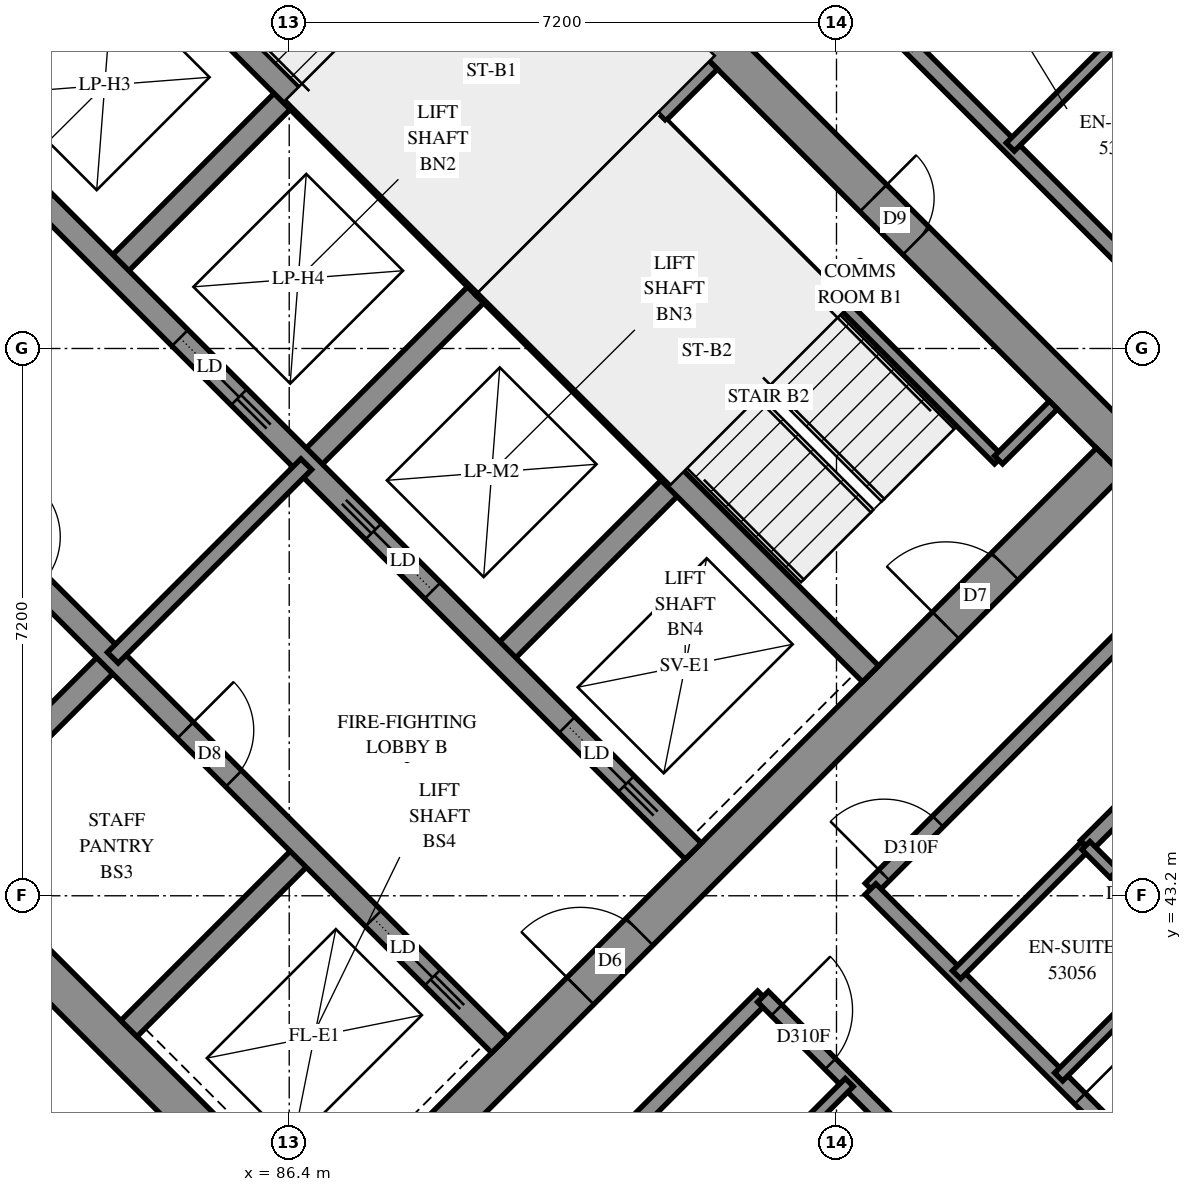
"""IFC4 building model, lengths in metres.
Left out: names, types, materials, properties, quantities, classifications, styles, units other than length and angle.
Written with IfcOpenShell. Run it as: python <this file> out.ifc"""

import sys

from ifc_helpers import new_model, si_unit, direction, frame, frame_2d, origin, place, context, subcontext, project, spatial, rectangle, extrude, element, fill, save


model = new_model("IFC4")
c1 = context("Model", 3, precision=1e-05, world=origin(), true_north=direction((0.0, 1.0)))
c2 = subcontext(c1, "Body", "Model", "MODEL_VIEW")
j1 = project(units=[si_unit("LENGTHUNIT", "METRE"), si_unit("PLANEANGLEUNIT", "RADIAN")], contexts=[c1])
p1 = place(None, origin())
s1 = spatial("IfcSite", under=j1, at=p1, CompositionType="ELEMENT")
p2 = place(p1, origin())
s2 = spatial("IfcBuilding", under=s1, at=p2, CompositionType="ELEMENT")
p3 = place(p2, frame((0.0, 0.0, 196.4)))
s3 = spatial("IfcBuildingStorey", under=s2, at=p3, CompositionType="ELEMENT", Elevation=196.4)
p4 = place(p3, frame((76.124, 49.267, -0.3), z_axis=(0.0, 0.0, 1.0), x_axis=(0.7071067812, -0.7071067812, 0.0)))
e1 = element("IfcWall", 1, at=p4, inside=s3, PredefinedType="SHEAR", context=c2, shape_type="SweptSolid", body=[
    extrude(rectangle(XDim=15.4, YDim=0.5, at=frame_2d((7.7, 0.0))), origin(), (0.0, 0.0, 1.0), 2.7),
])
p5 = place(p3, frame((86.66, 59.802, -0.3), z_axis=(0.0, 0.0, 1.0), x_axis=(0.7071067812, -0.7071067812, 0.0)))
e2 = element("IfcWall", 2, at=p5, inside=s3, PredefinedType="SHEAR", context=c2, shape_type="SweptSolid", body=[
    extrude(rectangle(XDim=15.4, YDim=0.5, at=frame_2d((7.7, 0.0))), origin(), (0.0, 0.0, 1.0), 2.7),
])
p6 = place(p5, frame((10.5, 0.0, 0.3)))
e3 = element("IfcOpeningElement", 3, at=p6, cuts=e2, PredefinedType="OPENING", context=c2, shape_type="SweptSolid", body=[
    extrude(rectangle(XDim=0.8, YDim=2.1, at=frame_2d((0.4, 1.05))), frame((0.0, 0.26, 0.0), z_axis=(0.0, -1.0, 0.0), x_axis=(1.0, 0.0, 0.0)), (0.0, 0.0, 1.0), 0.52),
])
p7 = place(p3, frame((76.478, 49.267, -0.3), z_axis=(0.0, 0.0, 1.0), x_axis=(0.7071067812, 0.7071067812, 0.0)))
e4 = element("IfcWall", 4, at=p7, inside=s3, PredefinedType="SHEAR", context=c2, shape_type="SweptSolid", body=[
    extrude(rectangle(XDim=14.4, YDim=0.5, at=frame_2d((7.2, 0.0))), origin(), (0.0, 0.0, 1.0), 2.7),
])
p8 = place(p7, frame((4.55, 0.0, 0.3)))
e5 = element("IfcOpeningElement", 5, at=p8, cuts=e4, PredefinedType="OPENING", context=c2, shape_type="SweptSolid", body=[
    extrude(rectangle(XDim=1.1, YDim=2.1, at=frame_2d((0.55, 1.05))), frame((0.0, 0.26, 0.0), z_axis=(0.0, -1.0, 0.0), x_axis=(1.0, 0.0, 0.0)), (0.0, 0.0, 1.0), 0.52),
])
p9 = place(p7, frame((11.35, 0.0, 0.3)))
e6 = element("IfcOpeningElement", 6, at=p9, cuts=e4, PredefinedType="OPENING", context=c2, shape_type="SweptSolid", body=[
    extrude(rectangle(XDim=1.1, YDim=2.1, at=frame_2d((0.55, 1.05))), frame((0.0, 0.26, 0.0), z_axis=(0.0, -1.0, 0.0), x_axis=(1.0, 0.0, 0.0)), (0.0, 0.0, 1.0), 0.52),
])
p10 = place(p3, frame((87.013, 38.731, -0.3), z_axis=(0.0, 0.0, 1.0), x_axis=(0.7071067812, 0.7071067812, 0.0)))
e7 = element("IfcWall", 7, at=p10, inside=s3, PredefinedType="SHEAR", context=c2, shape_type="SweptSolid", body=[
    extrude(rectangle(XDim=14.4, YDim=0.5, at=frame_2d((7.2, 0.0))), origin(), (0.0, 0.0, 1.0), 2.7),
])
p11 = place(p10, frame((4.55, 0.0, 0.3)))
e8 = element("IfcOpeningElement", 8, at=p11, cuts=e7, PredefinedType="OPENING", context=c2, shape_type="SweptSolid", body=[
    extrude(rectangle(XDim=1.1, YDim=2.1, at=frame_2d((0.55, 1.05))), frame((0.0, 0.26, 0.0), z_axis=(0.0, -1.0, 0.0), x_axis=(1.0, 0.0, 0.0)), (0.0, 0.0, 1.0), 0.52),
])
p12 = place(p10, frame((11.35, 0.0, 0.3)))
e9 = element("IfcOpeningElement", 9, at=p12, cuts=e7, PredefinedType="OPENING", context=c2, shape_type="SweptSolid", body=[
    extrude(rectangle(XDim=1.1, YDim=2.1, at=frame_2d((0.55, 1.05))), frame((0.0, 0.26, 0.0), z_axis=(0.0, -1.0, 0.0), x_axis=(1.0, 0.0, 0.0)), (0.0, 0.0, 1.0), 0.52),
])
p13 = place(p3, frame((84.079, 51.423, 0.0), z_axis=(0.0, 0.0, 1.0), x_axis=(0.7071219326, 0.7070916295, 0.0)))
e10 = element("IfcWall", 10, at=p13, inside=s3, PredefinedType="SOLIDWALL", context=c2, shape_type="SweptSolid", body=[
    extrude(rectangle(XDim=3.3, YDim=0.3, at=frame_2d((1.65, 0.0))), origin(), (0.0, 0.0, 1.0), 3.1),
])
p14 = place(p3, frame((81.746, 43.999, 0.0), z_axis=(0.0, 0.0, 1.0), x_axis=(0.7071067812, 0.7071067812, 0.0)))
e11 = element("IfcWall", 11, at=p14, inside=s3, PredefinedType="SOLIDWALL", context=c2, shape_type="SweptSolid", body=[
    extrude(rectangle(XDim=3.3, YDim=0.3, at=frame_2d((1.65, 0.0))), origin(), (0.0, 0.0, 1.0), 3.1),
])
p15 = place(p3, frame((86.625, 48.878, 0.0), z_axis=(0.0, 0.0, 1.0), x_axis=(0.7071067812, 0.7071067812, 0.0)))
e12 = element("IfcWall", 12, at=p15, inside=s3, PredefinedType="SOLIDWALL", context=c2, shape_type="SweptSolid", body=[
    extrude(rectangle(XDim=3.3, YDim=0.3, at=frame_2d((1.65, 0.0))), origin(), (0.0, 0.0, 1.0), 3.1),
])
p16 = place(p3, frame((84.291, 41.453, 0.0), z_axis=(0.0, 0.0, 1.0), x_axis=(0.7071067812, 0.7071067812, 0.0)))
e13 = element("IfcWall", 13, at=p16, inside=s3, PredefinedType="SOLIDWALL", context=c2, shape_type="SweptSolid", body=[
    extrude(rectangle(XDim=3.3, YDim=0.3, at=frame_2d((1.65, 0.0))), origin(), (0.0, 0.0, 1.0), 3.1),
])
p17 = place(p3, frame((89.17, 46.332, 0.0), z_axis=(0.0, 0.0, 1.0), x_axis=(0.7071067812, 0.7071067812, 0.0)))
e14 = element("IfcWall", 14, at=p17, inside=s3, PredefinedType="SOLIDWALL", context=c2, shape_type="SweptSolid", body=[
    extrude(rectangle(XDim=3.3, YDim=0.3, at=frame_2d((1.65, 0.0))), origin(), (0.0, 0.0, 1.0), 3.1),
])
p18 = place(p3, frame((78.988, 51.423, 0.0), z_axis=(0.0, 0.0, 1.0), x_axis=(0.7071067812, -0.7071067812, 0.0)))
e15 = element("IfcWall", 15, at=p18, inside=s3, PredefinedType="SOLIDWALL", context=c2, shape_type="SweptSolid", body=[
    extrude(rectangle(XDim=14.4, YDim=0.3, at=frame_2d((7.2, 0.0))), origin(), (0.0, 0.0, 1.0), 3.1),
])
p19 = place(p18, frame((1.35, 0.0, 0.0)))
e16 = element("IfcOpeningElement", 16, at=p19, cuts=e15, PredefinedType="OPENING", context=c2, shape_type="SweptSolid", body=[
    extrude(rectangle(XDim=0.9, YDim=2.1, at=frame_2d((0.45, 1.05))), frame((0.0, 0.16, 0.0), z_axis=(0.0, -1.0, 0.0), x_axis=(1.0, 0.0, 0.0)), (0.0, 0.0, 1.0), 0.32),
])
p20 = place(p18, frame((4.95, 0.0, 0.0)))
e17 = element("IfcOpeningElement", 17, at=p20, cuts=e15, PredefinedType="OPENING", context=c2, shape_type="SweptSolid", body=[
    extrude(rectangle(XDim=0.9, YDim=2.1, at=frame_2d((0.45, 1.05))), frame((0.0, 0.16, 0.0), z_axis=(0.0, -1.0, 0.0), x_axis=(1.0, 0.0, 0.0)), (0.0, 0.0, 1.0), 0.32),
])
p21 = place(p18, frame((8.55, 0.0, 0.0)))
e18 = element("IfcOpeningElement", 18, at=p21, cuts=e15, PredefinedType="OPENING", context=c2, shape_type="SweptSolid", body=[
    extrude(rectangle(XDim=0.9, YDim=2.1, at=frame_2d((0.45, 1.05))), frame((0.0, 0.16, 0.0), z_axis=(0.0, -1.0, 0.0), x_axis=(1.0, 0.0, 0.0)), (0.0, 0.0, 1.0), 0.32),
])
p22 = place(p18, frame((12.05, 0.0, 0.0)))
e19 = element("IfcOpeningElement", 19, at=p22, cuts=e15, PredefinedType="OPENING", context=c2, shape_type="SweptSolid", body=[
    extrude(rectangle(XDim=1.1, YDim=2.1, at=frame_2d((0.55, 1.05))), frame((0.0, 0.16, 0.0), z_axis=(0.0, -1.0, 0.0), x_axis=(1.0, 0.0, 0.0)), (0.0, 0.0, 1.0), 0.32),
])
p23 = place(p3, frame((81.534, 53.969, 0.0), z_axis=(0.0, 0.0, 1.0), x_axis=(0.707103309, -0.7071102534, 0.0)))
e20 = element("IfcWall", 20, at=p23, inside=s3, PredefinedType="SOLIDWALL", context=c2, shape_type="SweptSolid", body=[
    extrude(rectangle(XDim=14.4, YDim=0.3, at=frame_2d((7.2, 0.0))), origin(), (0.0, 0.0, 1.0), 3.1),
])
p24 = place(p23, frame((1.25, 0.0, 0.0)))
e21 = element("IfcOpeningElement", 21, at=p24, cuts=e20, PredefinedType="OPENING", context=c2, shape_type="SweptSolid", body=[
    extrude(rectangle(XDim=1.1, YDim=2.1, at=frame_2d((0.55, 1.05))), frame((0.0, 0.16, 0.0), z_axis=(0.0, -1.0, 0.0), x_axis=(1.0, 0.0, 0.0)), (0.0, 0.0, 1.0), 0.32),
])
p25 = place(p23, frame((4.85, 0.0, 0.0)))
e22 = element("IfcOpeningElement", 22, at=p25, cuts=e20, PredefinedType="OPENING", context=c2, shape_type="SweptSolid", body=[
    extrude(rectangle(XDim=1.1, YDim=2.1, at=frame_2d((0.55, 1.05))), frame((0.0, 0.16, 0.0), z_axis=(0.0, -1.0, 0.0), x_axis=(1.0, 0.0, 0.0)), (0.0, 0.0, 1.0), 0.32),
])
p26 = place(p23, frame((8.45, 0.0, 0.0)))
e23 = element("IfcOpeningElement", 23, at=p26, cuts=e20, PredefinedType="OPENING", context=c2, shape_type="SweptSolid", body=[
    extrude(rectangle(XDim=1.1, YDim=2.1, at=frame_2d((0.55, 1.05))), frame((0.0, 0.16, 0.0), z_axis=(0.0, -1.0, 0.0), x_axis=(1.0, 0.0, 0.0)), (0.0, 0.0, 1.0), 0.32),
])
p27 = place(p23, frame((12.05, 0.0, 0.0)))
e24 = element("IfcOpeningElement", 24, at=p27, cuts=e20, PredefinedType="OPENING", context=c2, shape_type="SweptSolid", body=[
    extrude(rectangle(XDim=1.1, YDim=2.1, at=frame_2d((0.55, 1.05))), frame((0.0, 0.16, 0.0), z_axis=(0.0, -1.0, 0.0), x_axis=(1.0, 0.0, 0.0)), (0.0, 0.0, 1.0), 0.32),
])
for number, where, z_axis, x_axis in (
    (25, (83.867, 56.302, 0.0), (0.0, 0.0, 1.0), (0.707, -0.707, 0.0)),
    (26, (88.958, 51.211, 0.0), (0.0, 0.0, 1.0), (0.707, -0.707, 0.0)),
):
    element("IfcWall", number, at=place(p3, frame(where, z_axis=z_axis, x_axis=x_axis)), inside=s3, PredefinedType="SOLIDWALL", context=c2, shape_type="SweptSolid", body=[
        extrude(rectangle(XDim=7.2, YDim=0.3, at=frame_2d((3.6, 0.0))), origin(), (0.0, 0.0, 1.0), 3.1),
    ])
p28 = place(p3, frame((88.958, 51.211, 0.0), z_axis=(0.0, 0.0, 1.0), x_axis=(0.7071067812, 0.7071067812, 0.0)))
e27 = element("IfcWall", 27, at=p28, inside=s3, PredefinedType="SOLIDWALL", context=c2, shape_type="SweptSolid", body=[
    extrude(rectangle(XDim=4.2, YDim=0.3, at=frame_2d((2.1, 0.0))), origin(), (0.0, 0.0, 1.0), 3.1),
])
p29 = place(p3, frame((91.313, 53.354, 0.0), z_axis=(0.0, 0.0, 1.0), x_axis=(0.7071147811, -0.7070987812, 0.0)))
e28 = element("IfcWall", 28, at=p29, inside=s3, PredefinedType="PARTITIONING", context=c2, shape_type="SweptSolid", body=[
    extrude(rectangle(XDim=6.25, YDim=0.15, at=frame_2d((3.125, 0.0))), origin(), (0.0, 0.0, 1.0), 3.1),
])
p30 = place(p3, frame((95.732, 48.934, 0.0), z_axis=(0.0, 0.0, 1.0), x_axis=(0.7071067812, 0.7071067812, 0.0)))
e29 = element("IfcWall", 29, at=p30, inside=s3, PredefinedType="PARTITIONING", context=c2, shape_type="SweptSolid", body=[
    extrude(rectangle(XDim=1.02, YDim=0.15, at=frame_2d((0.51, 0.0))), origin(), (0.0, 0.0, 1.0), 3.1),
])
p31 = place(p3, frame((84.079, 46.332, 0.0), z_axis=(0.0, 0.0, 1.0), x_axis=(0.7071067812, 0.7071067812, 0.0)))
e30 = element("IfcWall", 30, at=p31, inside=s3, PredefinedType="PARTITIONING", context=c2, shape_type="SweptSolid", body=[
    extrude(rectangle(XDim=3.6, YDim=0.2, at=frame_2d((1.8, 0.0))), origin(), (0.0, 0.0, 1.0), 3.1),
])
p32 = place(p3, frame((93.346, 55.599, 0.0), z_axis=(0.0, 0.0, 1.0), x_axis=(0.7071067812, -0.7071067812, 0.0)))
e31 = element("IfcWall", 31, at=p32, inside=s3, PredefinedType="PARTITIONING", context=c2, shape_type="SweptSolid", body=[
    extrude(rectangle(XDim=9.201, YDim=0.2, at=frame_2d((4.601, 0.0))), origin(), (0.0, 0.0, 1.0), 3.1),
])
p33 = place(p3, frame((94.049, 43.293, 0.0), z_axis=(0.0, 0.0, 1.0), x_axis=(0.7071067812, 0.7071067812, 0.0)))
e32 = element("IfcWall", 32, at=p33, inside=s3, PredefinedType="PARTITIONING", context=c2, shape_type="SweptSolid", body=[
    extrude(rectangle(XDim=8.2, YDim=0.2, at=frame_2d((4.1, 0.0))), origin(), (0.0, 0.0, 1.0), 3.1),
])
p34 = place(p33, frame((0.252, 0.0, 0.0)))
e33 = element("IfcOpeningElement", 33, at=p34, cuts=e32, PredefinedType="OPENING", context=c2, shape_type="SweptSolid", body=[
    extrude(rectangle(XDim=1.0, YDim=2.1, at=frame_2d((0.5, 1.05))), frame((0.0, 0.11, 0.0), z_axis=(0.0, -1.0, 0.0), x_axis=(1.0, 0.0, 0.0)), (0.0, 0.0, 1.0), 0.22),
])
p35 = place(p3, frame((86.835, 36.079, 0.0), z_axis=(0.0, 0.0, 1.0), x_axis=(0.7071067812, 0.7071067812, 0.0)))
e34 = element("IfcWall", 34, at=p35, inside=s3, PredefinedType="PARTITIONING", context=c2, shape_type="SweptSolid", body=[
    extrude(rectangle(XDim=8.2, YDim=0.2, at=frame_2d((4.1, 0.0))), origin(), (0.0, 0.0, 1.0), 3.1),
])
p36 = place(p3, frame((80.849, 42.061, 0.0), z_axis=(0.0, 0.0, 1.0), x_axis=(0.7071067812, -0.7071067812, 0.0)))
e35 = element("IfcWall", 35, at=p36, inside=s3, PredefinedType="PARTITIONING", context=c2, shape_type="SweptSolid", body=[
    extrude(rectangle(XDim=6.964, YDim=0.2, at=frame_2d((3.482, 0.0))), origin(), (0.0, 0.0, 1.0), 3.1),
])
p37 = place(p36, frame((5.159, 0.0, 0.0)))
e36 = element("IfcOpeningElement", 36, at=p37, cuts=e35, PredefinedType="OPENING", context=c2, shape_type="SweptSolid", body=[
    extrude(rectangle(XDim=0.9, YDim=2.1, at=frame_2d((0.45, 1.05))), frame((0.0, 0.11, 0.0), z_axis=(0.0, -1.0, 0.0), x_axis=(1.0, 0.0, 0.0)), (0.0, 0.0, 1.0), 0.22),
])
p38 = place(p3, frame((94.047, 43.287, 0.0), z_axis=(0.0, 0.0, 1.0), x_axis=(0.7071067812, -0.7071067812, 0.0)))
e37 = element("IfcWall", 37, at=p38, inside=s3, PredefinedType="PARTITIONING", context=c2, shape_type="SweptSolid", body=[
    extrude(rectangle(XDim=5.199, YDim=0.2, at=frame_2d((2.599, 0.0))), origin(), (0.0, 0.0, 1.0), 3.1),
])
p39 = place(p38, frame((3.898, 0.0, 0.0)))
e38 = element("IfcOpeningElement", 38, at=p39, cuts=e37, PredefinedType="OPENING", context=c2, shape_type="SweptSolid", body=[
    extrude(rectangle(XDim=0.9, YDim=2.1, at=frame_2d((0.45, 1.05))), frame((0.0, 0.11, 0.0), z_axis=(0.0, -1.0, 0.0), x_axis=(1.0, 0.0, 0.0)), (0.0, 0.0, 1.0), 0.22),
])
p40 = place(p3, frame((92.633, 41.873, 0.0), z_axis=(0.0, 0.0, 1.0), x_axis=(0.7071067812, -0.7071067812, 0.0)))
e39 = element("IfcWall", 39, at=p40, inside=s3, PredefinedType="PARTITIONING", context=c2, shape_type="SweptSolid", body=[
    extrude(rectangle(XDim=5.199, YDim=0.2, at=frame_2d((2.599, 0.0))), origin(), (0.0, 0.0, 1.0), 3.1),
])
p41 = place(p40, frame((0.253, 0.0, 0.0)))
e40 = element("IfcOpeningElement", 40, at=p41, cuts=e39, PredefinedType="OPENING", context=c2, shape_type="SweptSolid", body=[
    extrude(rectangle(XDim=1.0, YDim=2.1, at=frame_2d((0.5, 1.05))), frame((0.0, 0.11, 0.0), z_axis=(0.0, -1.0, 0.0), x_axis=(1.0, 0.0, 0.0)), (0.0, 0.0, 1.0), 0.22),
])
p42 = place(p40, frame((3.948, 0.0, 0.0)))
e41 = element("IfcOpeningElement", 41, at=p42, cuts=e39, PredefinedType="OPENING", context=c2, shape_type="SweptSolid", body=[
    extrude(rectangle(XDim=0.9, YDim=2.1, at=frame_2d((0.45, 1.05))), frame((0.0, 0.11, 0.0), z_axis=(0.0, -1.0, 0.0), x_axis=(1.0, 0.0, 0.0)), (0.0, 0.0, 1.0), 0.22),
])
p43 = place(p3, frame((96.88, 43.856, 0.0), z_axis=(0.0, 0.0, 1.0), x_axis=(0.7074098182, 0.7068036142, 0.0)))
e42 = element("IfcWall", 42, at=p43, inside=s3, PredefinedType="PARTITIONING", context=c2, shape_type="SweptSolid", body=[
    extrude(rectangle(XDim=3.299, YDim=0.2, at=frame_2d((1.65, 0.0))), origin(), (0.0, 0.0, 1.0), 3.1),
])
p44 = place(p3, frame((95.887, 53.051, 0.0), z_axis=(0.0, 0.0, 1.0), x_axis=(0.7070875415, 0.7071260204, 0.0)))
e43 = element("IfcWall", 43, at=p44, inside=s3, PredefinedType="PARTITIONING", context=c2, shape_type="SweptSolid", body=[
    extrude(rectangle(XDim=2.599, YDim=0.15, at=frame_2d((1.299, 0.0))), origin(), (0.0, 0.0, 1.0), 3.1),
])
for number, where, z_axis, x_axis in (
    (44, (96.523, 40.817, 0.0), (0.0, 0.0, 1.0), (0.707, 0.707, 0.0)),
    (45, (95.179, 42.161, 0.0), (0.0, 0.0, 1.0), (0.707, 0.707, 0.0)),
):
    element("IfcWall", number, at=place(p3, frame(where, z_axis=z_axis, x_axis=x_axis)), inside=s3, PredefinedType="PARTITIONING", context=c2, shape_type="SweptSolid", body=[
        extrude(rectangle(XDim=2.401, YDim=0.15, at=frame_2d((1.201, 0.0))), origin(), (0.0, 0.0, 1.0), 3.1),
    ])
p45 = place(p3, frame((92.072, 39.046, 0.0), z_axis=(0.0, 0.0, 1.0), x_axis=(0.706689978, 0.7075233388, 0.0)))
e46 = element("IfcWall", 46, at=p45, inside=s3, PredefinedType="PARTITIONING", context=c2, shape_type="SweptSolid", body=[
    extrude(rectangle(XDim=2.4, YDim=0.15, at=frame_2d((1.2, 0.0))), origin(), (0.0, 0.0, 1.0), 3.1),
])
p46 = place(p3, frame((96.881, 43.861, 0.0), z_axis=(0.0, 0.0, 1.0), x_axis=(0.7071067812, -0.7071067812, 0.0)))
e47 = element("IfcWall", 47, at=p46, inside=s3, PredefinedType="PARTITIONING", context=c2, shape_type="SweptSolid", body=[
    extrude(rectangle(XDim=1.901, YDim=0.15, at=frame_2d((0.95, 0.0))), origin(), (0.0, 0.0, 1.0), 3.1),
])
p47 = place(p46, frame((0.505, 0.0, 0.0)))
e48 = element("IfcOpeningElement", 48, at=p47, cuts=e47, PredefinedType="OPENING", context=c2, shape_type="SweptSolid", body=[
    extrude(rectangle(XDim=0.8, YDim=2.1, at=frame_2d((0.4, 1.05))), frame((0.0, 0.085, 0.0), z_axis=(0.0, -1.0, 0.0), x_axis=(1.0, 0.0, 0.0)), (0.0, 0.0, 1.0), 0.17),
])
p48 = place(p6, origin())
e49 = element("IfcDoor", 49, at=p48, inside=s3, OperationType="SINGLE_SWING_RIGHT", PredefinedType="DOOR", context=c2, shape_type="SweptSolid", body=[
    extrude(rectangle(XDim=0.8, YDim=2.1, at=frame_2d((0.4, 1.05))), frame((0.0, 0.025, 0.0), z_axis=(0.0, -1.0, 0.0), x_axis=(1.0, 0.0, 0.0)), (0.0, 0.0, 1.0), 0.05),
])
fill(e3, e49)
p49 = place(p11, origin())
e50 = element("IfcDoor", 50, at=p49, inside=s3, OperationType="DOUBLE_DOOR_SINGLE_SWING", PredefinedType="DOOR", context=c2, shape_type="SweptSolid", body=[
    extrude(rectangle(XDim=1.1, YDim=2.1, at=frame_2d((0.55, 1.05))), frame((0.0, 0.025, 0.0), z_axis=(0.0, -1.0, 0.0), x_axis=(1.0, 0.0, 0.0)), (0.0, 0.0, 1.0), 0.05),
])
fill(e8, e50)
p50 = place(p12, origin())
e51 = element("IfcDoor", 51, at=p50, inside=s3, OperationType="SINGLE_SWING_RIGHT", PredefinedType="DOOR", context=c2, shape_type="SweptSolid", body=[
    extrude(rectangle(XDim=1.1, YDim=2.1, at=frame_2d((0.55, 1.05))), frame((0.0, 0.025, 0.0), z_axis=(0.0, -1.0, 0.0), x_axis=(1.0, 0.0, 0.0)), (0.0, 0.0, 1.0), 0.05),
])
fill(e9, e51)
p51 = place(p21, origin())
e52 = element("IfcDoor", 52, at=p51, inside=s3, OperationType="SINGLE_SWING_LEFT", PredefinedType="DOOR", context=c2, shape_type="SweptSolid", body=[
    extrude(rectangle(XDim=0.9, YDim=2.1, at=frame_2d((0.45, 1.05))), frame((0.0, 0.025, 0.0), z_axis=(0.0, -1.0, 0.0), x_axis=(1.0, 0.0, 0.0)), (0.0, 0.0, 1.0), 0.05),
])
fill(e18, e52)
p52 = place(p22, origin())
e53 = element("IfcDoor", 53, at=p52, inside=s3, OperationType="SLIDING_TO_RIGHT", PredefinedType="DOOR", context=c2, shape_type="SweptSolid", body=[
    extrude(rectangle(XDim=1.1, YDim=2.1, at=frame_2d((0.55, 1.05))), frame((0.0, 0.025, 0.0), z_axis=(0.0, -1.0, 0.0), x_axis=(1.0, 0.0, 0.0)), (0.0, 0.0, 1.0), 0.05),
])
fill(e19, e53)
p53 = place(p25, origin())
e54 = element("IfcDoor", 54, at=p53, inside=s3, OperationType="SLIDING_TO_RIGHT", PredefinedType="DOOR", context=c2, shape_type="SweptSolid", body=[
    extrude(rectangle(XDim=1.1, YDim=2.1, at=frame_2d((0.55, 1.05))), frame((0.0, 0.025, 0.0), z_axis=(0.0, -1.0, 0.0), x_axis=(1.0, 0.0, 0.0)), (0.0, 0.0, 1.0), 0.05),
])
fill(e22, e54)
p54 = place(p26, origin())
e55 = element("IfcDoor", 55, at=p54, inside=s3, OperationType="SLIDING_TO_LEFT", PredefinedType="DOOR", context=c2, shape_type="SweptSolid", body=[
    extrude(rectangle(XDim=1.1, YDim=2.1, at=frame_2d((0.55, 1.05))), frame((0.0, 0.025, 0.0), z_axis=(0.0, -1.0, 0.0), x_axis=(1.0, 0.0, 0.0)), (0.0, 0.0, 1.0), 0.05),
])
fill(e23, e55)
p55 = place(p27, origin())
e56 = element("IfcDoor", 56, at=p55, inside=s3, OperationType="SLIDING_TO_RIGHT", PredefinedType="DOOR", context=c2, shape_type="SweptSolid", body=[
    extrude(rectangle(XDim=1.1, YDim=2.1, at=frame_2d((0.55, 1.05))), frame((0.0, 0.025, 0.0), z_axis=(0.0, -1.0, 0.0), x_axis=(1.0, 0.0, 0.0)), (0.0, 0.0, 1.0), 0.05),
])
fill(e24, e56)
p56 = place(p34, origin())
e57 = element("IfcDoor", 57, at=p56, inside=s3, OperationType="SINGLE_SWING_RIGHT", PredefinedType="DOOR", context=c2, shape_type="SweptSolid", body=[
    extrude(rectangle(XDim=1.0, YDim=2.1, at=frame_2d((0.5, 1.05))), frame((0.0, 0.025, 0.0), z_axis=(0.0, -1.0, 0.0), x_axis=(1.0, 0.0, 0.0)), (0.0, 0.0, 1.0), 0.05),
])
fill(e33, e57)
p57 = place(p41, origin())
e58 = element("IfcDoor", 58, at=p57, inside=s3, OperationType="SINGLE_SWING_RIGHT", PredefinedType="DOOR", context=c2, shape_type="SweptSolid", body=[
    extrude(rectangle(XDim=1.0, YDim=2.1, at=frame_2d((0.5, 1.05))), frame((0.0, 0.025, 0.0), z_axis=(0.0, -1.0, 0.0), x_axis=(1.0, 0.0, 0.0)), (0.0, 0.0, 1.0), 0.05),
])
fill(e40, e58)
p58 = place(p39, origin())
e59 = element("IfcDoor", 59, at=p58, inside=s3, OperationType="SINGLE_SWING_RIGHT", PredefinedType="DOOR", context=c2, shape_type="SweptSolid", body=[
    extrude(rectangle(XDim=0.9, YDim=2.1, at=frame_2d((0.45, 1.05))), frame((0.0, 0.025, 0.0), z_axis=(0.0, -1.0, 0.0), x_axis=(1.0, 0.0, 0.0)), (0.0, 0.0, 1.0), 0.05),
])
fill(e38, e59)
p59 = place(p47, origin())
e60 = element("IfcDoor", 60, at=p59, inside=s3, OperationType="SINGLE_SWING_RIGHT", PredefinedType="DOOR", context=c2, shape_type="SweptSolid", body=[
    extrude(rectangle(XDim=0.8, YDim=2.1, at=frame_2d((0.4, 1.05))), frame((0.0, 0.025, 0.0), z_axis=(0.0, -1.0, 0.0), x_axis=(1.0, 0.0, 0.0)), (0.0, 0.0, 1.0), 0.05),
])
fill(e48, e60)
save(model, sys.argv[1])
